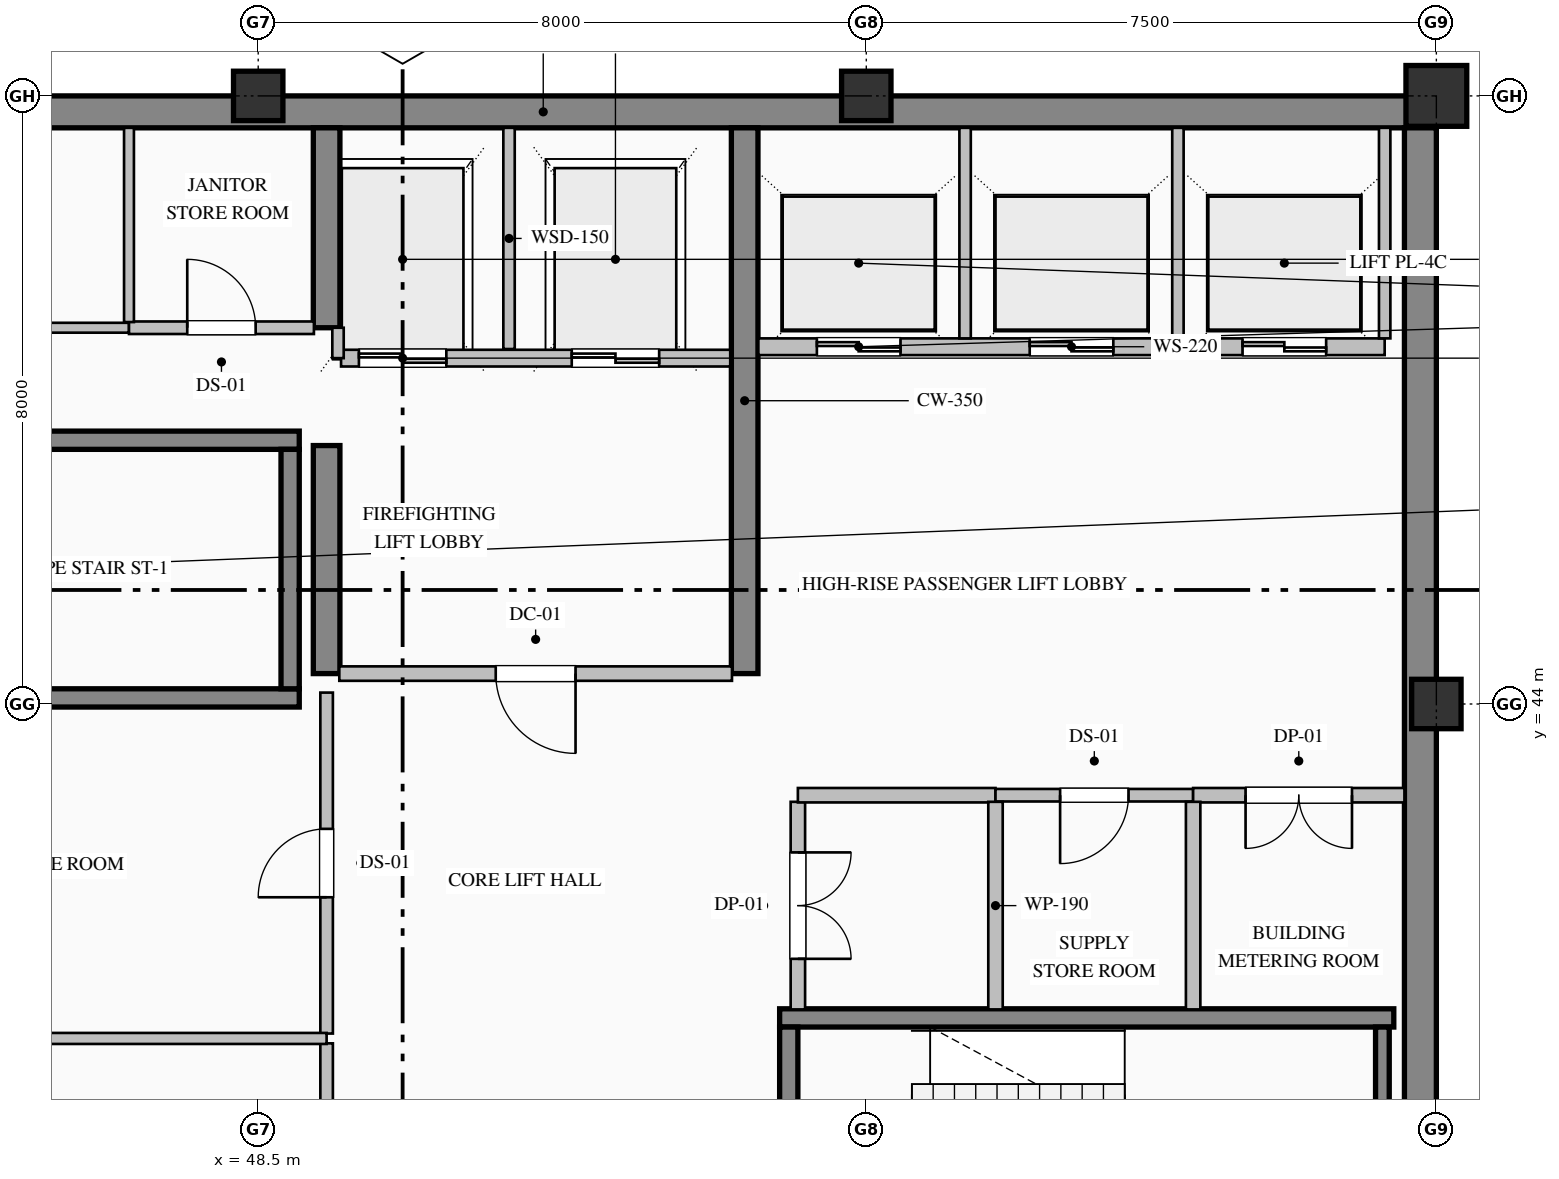
"""IFC4 building model, lengths in metres.
Left out: names, types, materials, properties, quantities, classifications, styles, units other than length and angle.
Written with IfcOpenShell. Run it as: python <this file> out.ifc"""

import sys

from ifc_helpers import new_model, si_unit, direction, frame, frame_2d, origin, origin_2d, place, context, subcontext, project, spatial, rectangle, hollow_rectangle, extrude, element, fill, save


model = new_model("IFC4")
c1 = context("Model", 3, precision=1e-05, world=origin(), true_north=direction((0.0, 1.0)))
c2 = subcontext(c1, "Body", "Model", "MODEL_VIEW")
j1 = project(units=[si_unit("LENGTHUNIT", "METRE"), si_unit("PLANEANGLEUNIT", "RADIAN")], contexts=[c1])
p1 = place(None, origin())
s1 = spatial("IfcSite", under=j1, at=p1, CompositionType="ELEMENT")
p2 = place(p1, origin())
s2 = spatial("IfcBuilding", under=s1, at=p2, CompositionType="ELEMENT")
p3 = place(p2, frame((0.0, 0.0, 307.2)))
s3 = spatial("IfcBuildingStorey", under=s2, at=p3, CompositionType="ELEMENT", Elevation=307.2)
p4 = place(p3, frame((40.5, 51.79, 0.0), z_axis=(0.0, 0.0, 1.0), x_axis=(1.0, 0.0, 0.0)))
e1 = element("IfcWall", 1, at=p4, inside=s3, PredefinedType="SHEAR", context=c2, shape_type="SweptSolid", body=[
    extrude(rectangle(XDim=23.5, YDim=0.42, at=frame_2d((11.75, 0.0))), origin(), (0.0, 0.0, 1.0), 3.785),
])
p5 = place(p3, frame((63.79, 36.32, 0.0), z_axis=(0.0, 0.0, 1.0), x_axis=(0.0, 1.0, 0.0)))
e2 = element("IfcWall", 2, at=p5, inside=s3, PredefinedType="SHEAR", context=c2, shape_type="SweptSolid", body=[
    extrude(rectangle(XDim=15.26, YDim=0.42, at=frame_2d((7.63, 0.0))), origin(), (0.0, 0.0, 1.0), 3.785),
])
p6 = place(p3, frame((49.4, 44.4, 0.0), z_axis=(0.0, 0.0, 1.0), x_axis=(0.0, 1.0, 0.0)))
e3 = element("IfcWall", 3, at=p6, inside=s3, PredefinedType="SHEAR", context=c2, shape_type="SweptSolid", body=[
    extrude(rectangle(XDim=3.0, YDim=0.35, at=frame_2d((1.5, 0.0))), origin(), (0.0, 0.0, 1.0), 3.785),
])
p7 = place(p3, frame((49.4, 48.95, 0.0), z_axis=(0.0, 0.0, 1.0), x_axis=(0.0, 1.0, 0.0)))
e4 = element("IfcWall", 4, at=p7, inside=s3, PredefinedType="SHEAR", context=c2, shape_type="SweptSolid", body=[
    extrude(rectangle(XDim=2.63, YDim=0.35, at=frame_2d((1.315, 0.0))), origin(), (0.0, 0.0, 1.0), 3.785),
])
p8 = place(p3, frame((54.9, 44.4, 0.0), z_axis=(0.0, 0.0, 1.0), x_axis=(0.0, 1.0, 0.0)))
e5 = element("IfcWall", 5, at=p8, inside=s3, PredefinedType="SHEAR", context=c2, shape_type="SweptSolid", body=[
    extrude(rectangle(XDim=7.18, YDim=0.35, at=frame_2d((3.59, 0.0))), origin(), (0.0, 0.0, 1.0), 3.785),
])
for number, where, z_axis, x_axis in (
    (6, (48.5, 52.0, 0.0), (0.0, 0.0, 1.0), (1.0, 0.0, 0.0)),
    (7, (56.5, 52.0, 0.0), (0.0, 0.0, 1.0), (1.0, 0.0, 0.0)),
    (8, (64.0, 44.0, 0.0), (0.0, 0.0, 1.0), (1.0, 0.0, 0.0)),
):
    element("IfcColumn", number, at=place(p3, frame(where, z_axis=z_axis, x_axis=x_axis)), inside=s3, PredefinedType="COLUMN", context=c2, shape_type="SweptSolid", body=[
        extrude(hollow_rectangle(XDim=0.65, YDim=0.65, WallThickness=0.028, at=origin_2d()), origin(), (0.0, 0.0, 1.0), 4.0),
    ])
p9 = place(p3, frame((64.0, 52.0, 0.0), z_axis=(0.0, 0.0, 1.0), x_axis=(1.0, 0.0, 0.0)))
e9 = element("IfcColumn", 9, at=p9, inside=s3, PredefinedType="COLUMN", context=c2, shape_type="SweptSolid", body=[
    extrude(hollow_rectangle(XDim=0.8, YDim=0.8, WallThickness=0.032, at=origin_2d()), origin(), (0.0, 0.0, 1.0), 4.0),
])
for number, where, z_axis, x_axis in (
    (10, (40.96, 47.47, 0.0), (0.0, 0.0, 1.0), (1.0, 0.0, 0.0)),
    (11, (49.04, 44.08, 0.0), (0.0, 0.0, 1.0), (-1.0, 0.0, 0.0)),
):
    element("IfcWall", number, at=place(p3, frame(where, z_axis=z_axis, x_axis=x_axis)), inside=s3, PredefinedType="SOLIDWALL", context=c2, shape_type="SweptSolid", body=[
        extrude(rectangle(XDim=8.08, YDim=0.24, at=frame_2d((4.04, 0.0))), origin(), (0.0, 0.0, 1.0), 4.0),
    ])
p10 = place(p3, frame((48.92, 44.2, 0.0), z_axis=(0.0, 0.0, 1.0), x_axis=(0.0, 1.0, 0.0)))
e12 = element("IfcWall", 12, at=p10, inside=s3, PredefinedType="SOLIDWALL", context=c2, shape_type="SweptSolid", body=[
    extrude(rectangle(XDim=3.15, YDim=0.24, at=frame_2d((1.575, 0.0))), origin(), (0.0, 0.0, 1.0), 4.0),
])
p11 = place(p3, frame((55.36, 39.87, 0.0), z_axis=(0.0, 0.0, 1.0), x_axis=(1.0, 0.0, 0.0)))
e13 = element("IfcWall", 13, at=p11, inside=s3, PredefinedType="SOLIDWALL", context=c2, shape_type="SweptSolid", body=[
    extrude(rectangle(XDim=8.08, YDim=0.24, at=frame_2d((4.04, 0.0))), origin(), (0.0, 0.0, 1.0), 4.0),
])
p12 = place(p3, frame((55.48, 39.75, 0.0), z_axis=(0.0, 0.0, 1.0), x_axis=(0.0, -1.0, 0.0)))
e14 = element("IfcWall", 14, at=p12, inside=s3, PredefinedType="SOLIDWALL", context=c2, shape_type="SweptSolid", body=[
    extrude(rectangle(XDim=3.15, YDim=0.24, at=frame_2d((1.575, 0.0))), origin(), (0.0, 0.0, 1.0), 4.0),
])
p13 = place(p12, frame((1.0, 0.0, 0.0)))
e15 = element("IfcOpeningElement", 15, at=p13, cuts=e14, PredefinedType="OPENING", context=c2, shape_type="SweptSolid", body=[
    extrude(rectangle(XDim=1.15, YDim=2.2, at=frame_2d((0.575, 1.1))), frame((0.0, 0.13, 0.0), z_axis=(0.0, -1.0, 0.0), x_axis=(1.0, 0.0, 0.0)), (0.0, 0.0, 1.0), 0.26),
])
p14 = place(p3, frame((63.29, 36.6, 0.0), z_axis=(0.0, 0.0, 1.0), x_axis=(0.0, 1.0, 0.0)))
e16 = element("IfcWall", 16, at=p14, inside=s3, PredefinedType="SOLIDWALL", context=c2, shape_type="SweptSolid", body=[
    extrude(rectangle(XDim=3.15, YDim=0.18, at=frame_2d((1.575, 0.0))), origin(), (0.0, 0.0, 1.0), 4.0),
])
p15 = place(p3, frame((54.71, 48.55, 0.0), z_axis=(0.0, 0.0, 1.0), x_axis=(-1.0, 0.0, 0.0)))
e17 = element("IfcWall", 17, at=p15, inside=s3, PredefinedType="PARTITIONING", context=c2, shape_type="SweptSolid", body=[
    extrude(rectangle(XDim=5.12, YDim=0.22, at=frame_2d((2.56, 0.0))), origin(), (0.0, 0.0, 1.0), 3.785),
])
p16 = place(p15, frame((3.735, 0.0, 0.0)))
e18 = element("IfcOpeningElement", 18, at=p16, cuts=e17, PredefinedType="OPENING", context=c2, shape_type="SweptSolid", body=[
    extrude(rectangle(XDim=1.15, YDim=2.2, at=frame_2d((0.575, 1.1))), frame((0.0, 0.12, 0.0), z_axis=(0.0, -1.0, 0.0), x_axis=(1.0, 0.0, 0.0)), (0.0, 0.0, 1.0), 0.24),
])
p17 = place(p15, frame((0.935, 0.0, 0.0)))
e19 = element("IfcOpeningElement", 19, at=p17, cuts=e17, PredefinedType="OPENING", context=c2, shape_type="SweptSolid", body=[
    extrude(rectangle(XDim=1.15, YDim=2.2, at=frame_2d((0.575, 1.1))), frame((0.0, 0.12, 0.0), z_axis=(0.0, -1.0, 0.0), x_axis=(1.0, 0.0, 0.0)), (0.0, 0.0, 1.0), 0.24),
])
p18 = place(p3, frame((51.8, 48.67, 0.0), z_axis=(0.0, 0.0, 1.0), x_axis=(0.0, 1.0, 0.0)))
e20 = element("IfcWall", 20, at=p18, inside=s3, PredefinedType="PARTITIONING", context=c2, shape_type="SweptSolid", body=[
    extrude(rectangle(XDim=2.91, YDim=0.15, at=frame_2d((1.455, 0.0))), origin(), (0.0, 0.0, 1.0), 3.785),
])
p19 = place(p3, frame((49.55, 48.55, 0.0), z_axis=(0.0, 0.0, 1.0), x_axis=(0.0, 1.0, 0.0)))
e21 = element("IfcWall", 21, at=p19, inside=s3, PredefinedType="PARTITIONING", context=c2, shape_type="SweptSolid", body=[
    extrude(rectangle(XDim=0.4, YDim=0.15, at=frame_2d((0.2, 0.0))), origin(), (0.0, 0.0, 1.0), 3.785),
])
p20 = place(p3, frame((63.32, 48.7, 0.0), z_axis=(0.0, 0.0, 1.0), x_axis=(-1.0, 0.0, 0.0)))
e22 = element("IfcWall", 22, at=p20, inside=s3, PredefinedType="PARTITIONING", context=c2, shape_type="SweptSolid", body=[
    extrude(rectangle(XDim=8.24, YDim=0.22, at=frame_2d((4.12, 0.0))), origin(), (0.0, 0.0, 1.0), 3.785),
])
p21 = place(p20, frame((6.37, 0.0, 0.0)))
e23 = element("IfcOpeningElement", 23, at=p21, cuts=e22, PredefinedType="OPENING", context=c2, shape_type="SweptSolid", body=[
    extrude(rectangle(XDim=1.1, YDim=2.2, at=frame_2d((0.55, 1.1))), frame((0.0, 0.12, 0.0), z_axis=(0.0, -1.0, 0.0), x_axis=(1.0, 0.0, 0.0)), (0.0, 0.0, 1.0), 0.24),
])
p22 = place(p20, frame((3.57, 0.0, 0.0)))
e24 = element("IfcOpeningElement", 24, at=p22, cuts=e22, PredefinedType="OPENING", context=c2, shape_type="SweptSolid", body=[
    extrude(rectangle(XDim=1.1, YDim=2.2, at=frame_2d((0.55, 1.1))), frame((0.0, 0.12, 0.0), z_axis=(0.0, -1.0, 0.0), x_axis=(1.0, 0.0, 0.0)), (0.0, 0.0, 1.0), 0.24),
])
p23 = place(p20, frame((0.77, 0.0, 0.0)))
e25 = element("IfcOpeningElement", 25, at=p23, cuts=e22, PredefinedType="OPENING", context=c2, shape_type="SweptSolid", body=[
    extrude(rectangle(XDim=1.1, YDim=2.2, at=frame_2d((0.55, 1.1))), frame((0.0, 0.12, 0.0), z_axis=(0.0, -1.0, 0.0), x_axis=(1.0, 0.0, 0.0)), (0.0, 0.0, 1.0), 0.24),
])
for number, where, z_axis, x_axis in (
    (26, (57.8, 48.81, 0.0), (0.0, 0.0, 1.0), (0.0, 1.0, 0.0)),
    (27, (60.6, 48.81, 0.0), (0.0, 0.0, 1.0), (0.0, 1.0, 0.0)),
    (28, (63.32, 48.81, 0.0), (0.0, 0.0, 1.0), (0.0, 1.0, 0.0)),
):
    element("IfcWall", number, at=place(p3, frame(where, z_axis=z_axis, x_axis=x_axis)), inside=s3, PredefinedType="PARTITIONING", context=c2, shape_type="SweptSolid", body=[
        extrude(rectangle(XDim=2.77, YDim=0.15, at=frame_2d((1.385, 0.0))), origin(), (0.0, 0.0, 1.0), 3.785),
    ])
p24 = place(p3, frame((40.92, 48.95, 0.0), z_axis=(0.0, 0.0, 1.0), x_axis=(1.0, 0.0, 0.0)))
e29 = element("IfcWall", 29, at=p24, inside=s3, PredefinedType="PARTITIONING", context=c2, shape_type="SweptSolid", body=[
    extrude(rectangle(XDim=5.88, YDim=0.13, at=frame_2d((2.94, 0.0))), origin(), (0.0, 0.0, 1.0), 3.785),
])
p25 = place(p24, frame((2.48, 0.0, 0.0)))
e30 = element("IfcOpeningElement", 30, at=p25, cuts=e29, PredefinedType="OPENING", context=c2, shape_type="SweptSolid", body=[
    extrude(rectangle(XDim=0.92, YDim=2.15, at=frame_2d((0.46, 1.075))), frame((0.0, 0.075, 0.0), z_axis=(0.0, -1.0, 0.0), x_axis=(1.0, 0.0, 0.0)), (0.0, 0.0, 1.0), 0.15),
])
p26 = place(p3, frame((46.8, 48.95, 0.0), z_axis=(0.0, 0.0, 1.0), x_axis=(1.0, 0.0, 0.0)))
e31 = element("IfcWall", 31, at=p26, inside=s3, PredefinedType="PARTITIONING", context=c2, shape_type="SweptSolid", body=[
    extrude(rectangle(XDim=2.433, YDim=0.165, at=frame_2d((1.216, 0.0))), origin(), (0.0, 0.0, 1.0), 3.785),
])
p27 = place(p26, frame((0.767, 0.0, 0.0)))
e32 = element("IfcOpeningElement", 32, at=p27, cuts=e31, PredefinedType="OPENING", context=c2, shape_type="SweptSolid", body=[
    extrude(rectangle(XDim=0.9, YDim=2.15, at=frame_2d((0.45, 1.075))), frame((0.0, 0.093, 0.0), z_axis=(0.0, -1.0, 0.0), x_axis=(1.0, 0.0, 0.0)), (0.0, 0.0, 1.0), 0.185),
])
p28 = place(p3, frame((54.733, 44.4, 0.0), z_axis=(0.0, 0.0, 1.0), x_axis=(-1.0, 0.0, 0.0)))
e33 = element("IfcWall", 33, at=p28, inside=s3, PredefinedType="PARTITIONING", context=c2, shape_type="SweptSolid", body=[
    extrude(rectangle(XDim=5.166, YDim=0.19, at=frame_2d((2.583, 0.0))), origin(), (0.0, 0.0, 1.0), 3.785),
])
p29 = place(p28, frame((2.058, 0.0, 0.0)))
e34 = element("IfcOpeningElement", 34, at=p29, cuts=e33, PredefinedType="OPENING", context=c2, shape_type="SweptSolid", body=[
    extrude(rectangle(XDim=1.05, YDim=2.15, at=frame_2d((0.525, 1.075))), frame((0.0, 0.105, 0.0), z_axis=(0.0, -1.0, 0.0), x_axis=(1.0, 0.0, 0.0)), (0.0, 0.0, 1.0), 0.21),
])
p30 = place(p3, frame((49.4, 36.42, 0.0), z_axis=(0.0, 0.0, 1.0), x_axis=(0.0, 1.0, 0.0)))
e35 = element("IfcWall", 35, at=p30, inside=s3, PredefinedType="PARTITIONING", context=c2, shape_type="SweptSolid", body=[
    extrude(rectangle(XDim=3.115, YDim=0.165, at=frame_2d((1.558, 0.0))), origin(), (0.0, 0.0, 1.0), 3.027),
])
p31 = place(p30, frame((1.058, 0.0, 0.0)))
e36 = element("IfcOpeningElement", 36, at=p31, cuts=e35, PredefinedType="OPENING", context=c2, shape_type="SweptSolid", body=[
    extrude(rectangle(XDim=1.0, YDim=2.15, at=frame_2d((0.5, 1.075))), frame((0.0, 0.093, 0.0), z_axis=(0.0, -1.0, 0.0), x_axis=(1.0, 0.0, 0.0)), (0.0, 0.0, 1.0), 0.185),
])
p32 = place(p3, frame((49.4, 39.665, 0.0), z_axis=(0.0, 0.0, 1.0), x_axis=(0.0, 1.0, 0.0)))
e37 = element("IfcWall", 37, at=p32, inside=s3, PredefinedType="PARTITIONING", context=c2, shape_type="SweptSolid", body=[
    extrude(rectangle(XDim=4.485, YDim=0.165, at=frame_2d((2.243, 0.0))), origin(), (0.0, 0.0, 1.0), 3.027),
])
p33 = place(p32, frame((1.793, 0.0, 0.0)))
e38 = element("IfcOpeningElement", 38, at=p33, cuts=e37, PredefinedType="OPENING", context=c2, shape_type="SweptSolid", body=[
    extrude(rectangle(XDim=0.9, YDim=2.15, at=frame_2d((0.45, 1.075))), frame((0.0, 0.093, 0.0), z_axis=(0.0, -1.0, 0.0), x_axis=(1.0, 0.0, 0.0)), (0.0, 0.0, 1.0), 0.185),
])
p34 = place(p3, frame((55.6, 42.713, 0.0), z_axis=(0.0, 0.0, 1.0), x_axis=(0.0, -1.0, 0.0)))
e39 = element("IfcWall", 39, at=p34, inside=s3, PredefinedType="PARTITIONING", context=c2, shape_type="SweptSolid", body=[
    extrude(rectangle(XDim=2.731, YDim=0.19, at=frame_2d((1.365, 0.0))), origin(), (0.0, 0.0, 1.0), 3.785),
])
p35 = place(p34, frame((0.666, 0.0, 0.0)))
e40 = element("IfcOpeningElement", 40, at=p35, cuts=e39, PredefinedType="OPENING", context=c2, shape_type="SweptSolid", body=[
    extrude(rectangle(XDim=1.4, YDim=2.25, at=frame_2d((0.7, 1.125))), frame((0.0, 0.105, 0.0), z_axis=(0.0, -1.0, 0.0), x_axis=(1.0, 0.0, 0.0)), (0.0, 0.0, 1.0), 0.21),
])
p36 = place(p3, frame((40.92, 39.6, 0.0), z_axis=(0.0, 0.0, 1.0), x_axis=(1.0, 0.0, 0.0)))
e41 = element("IfcWall", 41, at=p36, inside=s3, PredefinedType="PARTITIONING", context=c2, shape_type="SweptSolid", body=[
    extrude(rectangle(XDim=8.48, YDim=0.145, at=frame_2d((4.24, 0.0))), origin(), (0.0, 0.0, 1.0), 3.785),
])
p37 = place(p3, frame((58.2, 42.8, 0.0), z_axis=(0.0, 0.0, 1.0), x_axis=(-1.0, 0.0, 0.0)))
e42 = element("IfcWall", 42, at=p37, inside=s3, PredefinedType="PARTITIONING", context=c2, shape_type="SweptSolid", body=[
    extrude(rectangle(XDim=2.6, YDim=0.19, at=frame_2d((1.3, 0.0))), origin(), (0.0, 0.0, 1.0), 3.785),
])
p38 = place(p3, frame((60.8, 42.8, 0.0), z_axis=(0.0, 0.0, 1.0), x_axis=(-1.0, 0.0, 0.0)))
e43 = element("IfcWall", 43, at=p38, inside=s3, PredefinedType="PARTITIONING", context=c2, shape_type="SweptSolid", body=[
    extrude(rectangle(XDim=2.6, YDim=0.165, at=frame_2d((1.3, 0.0))), origin(), (0.0, 0.0, 1.0), 3.785),
])
p39 = place(p38, frame((0.85, 0.0, 0.0)))
e44 = element("IfcOpeningElement", 44, at=p39, cuts=e43, PredefinedType="OPENING", context=c2, shape_type="SweptSolid", body=[
    extrude(rectangle(XDim=0.9, YDim=2.15, at=frame_2d((0.45, 1.075))), frame((0.0, 0.093, 0.0), z_axis=(0.0, -1.0, 0.0), x_axis=(1.0, 0.0, 0.0)), (0.0, 0.0, 1.0), 0.185),
])
p40 = place(p3, frame((63.58, 42.8, 0.0), z_axis=(0.0, 0.0, 1.0), x_axis=(-1.0, 0.0, 0.0)))
e45 = element("IfcWall", 45, at=p40, inside=s3, PredefinedType="PARTITIONING", context=c2, shape_type="SweptSolid", body=[
    extrude(rectangle(XDim=2.78, YDim=0.19, at=frame_2d((1.39, 0.0))), origin(), (0.0, 0.0, 1.0), 3.785),
])
p41 = place(p40, frame((0.69, 0.0, 0.0)))
e46 = element("IfcOpeningElement", 46, at=p41, cuts=e45, PredefinedType="OPENING", context=c2, shape_type="SweptSolid", body=[
    extrude(rectangle(XDim=1.4, YDim=2.25, at=frame_2d((0.7, 1.125))), frame((0.0, 0.105, 0.0), z_axis=(0.0, -1.0, 0.0), x_axis=(1.0, 0.0, 0.0)), (0.0, 0.0, 1.0), 0.21),
])
p42 = place(p3, frame((46.8, 51.58, 0.0), z_axis=(0.0, 0.0, 1.0), x_axis=(0.0, -1.0, 0.0)))
e47 = element("IfcWall", 47, at=p42, inside=s3, PredefinedType="PARTITIONING", context=c2, shape_type="SweptSolid", body=[
    extrude(rectangle(XDim=2.556, YDim=0.13, at=frame_2d((1.278, 0.0))), origin(), (0.0, 0.0, 1.0), 3.785),
])
for number, where, z_axis, x_axis in (
    (48, (58.2, 42.713, 0.0), (0.0, 0.0, 1.0), (0.0, -1.0, 0.0)),
    (49, (60.8, 42.713, 0.0), (0.0, 0.0, 1.0), (0.0, -1.0, 0.0)),
):
    element("IfcWall", number, at=place(p3, frame(where, z_axis=z_axis, x_axis=x_axis)), inside=s3, PredefinedType="PARTITIONING", context=c2, shape_type="SweptSolid", body=[
        extrude(rectangle(XDim=2.731, YDim=0.19, at=frame_2d((1.365, 0.0))), origin(), (0.0, 0.0, 1.0), 3.785),
    ])
p43 = place(p16, origin())
e50 = element("IfcDoor", 50, at=p43, inside=s3, OperationType="DOUBLE_DOOR_SLIDING", PredefinedType="DOOR", context=c2, shape_type="SweptSolid", body=[
    extrude(rectangle(XDim=1.15, YDim=2.2, at=frame_2d((0.575, 1.1))), frame((0.0, 0.025, 0.0), z_axis=(0.0, -1.0, 0.0), x_axis=(1.0, 0.0, 0.0)), (0.0, 0.0, 1.0), 0.05),
])
fill(e18, e50)
p44 = place(p17, origin())
e51 = element("IfcDoor", 51, at=p44, inside=s3, OperationType="DOUBLE_DOOR_SLIDING", PredefinedType="DOOR", context=c2, shape_type="SweptSolid", body=[
    extrude(rectangle(XDim=1.15, YDim=2.2, at=frame_2d((0.575, 1.1))), frame((0.0, 0.025, 0.0), z_axis=(0.0, -1.0, 0.0), x_axis=(1.0, 0.0, 0.0)), (0.0, 0.0, 1.0), 0.05),
])
fill(e19, e51)
p45 = place(p21, origin())
e52 = element("IfcDoor", 52, at=p45, inside=s3, OperationType="DOUBLE_DOOR_SLIDING", PredefinedType="DOOR", context=c2, shape_type="SweptSolid", body=[
    extrude(rectangle(XDim=1.1, YDim=2.2, at=frame_2d((0.55, 1.1))), frame((0.0, 0.025, 0.0), z_axis=(0.0, -1.0, 0.0), x_axis=(1.0, 0.0, 0.0)), (0.0, 0.0, 1.0), 0.05),
])
fill(e23, e52)
p46 = place(p22, origin())
e53 = element("IfcDoor", 53, at=p46, inside=s3, OperationType="DOUBLE_DOOR_SLIDING", PredefinedType="DOOR", context=c2, shape_type="SweptSolid", body=[
    extrude(rectangle(XDim=1.1, YDim=2.2, at=frame_2d((0.55, 1.1))), frame((0.0, 0.025, 0.0), z_axis=(0.0, -1.0, 0.0), x_axis=(1.0, 0.0, 0.0)), (0.0, 0.0, 1.0), 0.05),
])
fill(e24, e53)
p47 = place(p23, origin())
e54 = element("IfcDoor", 54, at=p47, inside=s3, OperationType="DOUBLE_DOOR_SLIDING", PredefinedType="DOOR", context=c2, shape_type="SweptSolid", body=[
    extrude(rectangle(XDim=1.1, YDim=2.2, at=frame_2d((0.55, 1.1))), frame((0.0, 0.025, 0.0), z_axis=(0.0, -1.0, 0.0), x_axis=(1.0, 0.0, 0.0)), (0.0, 0.0, 1.0), 0.05),
])
fill(e25, e54)
p48 = place(p29, origin())
e55 = element("IfcDoor", 55, at=p48, inside=s3, OperationType="SINGLE_SWING_LEFT", PredefinedType="DOOR", context=c2, shape_type="SweptSolid", body=[
    extrude(rectangle(XDim=1.05, YDim=2.15, at=frame_2d((0.525, 1.075))), frame((0.0, 0.025, 0.0), z_axis=(0.0, -1.0, 0.0), x_axis=(1.0, 0.0, 0.0)), (0.0, 0.0, 1.0), 0.05),
])
fill(e34, e55)
p49 = place(p33, origin())
e56 = element("IfcDoor", 56, at=p49, inside=s3, OperationType="SINGLE_SWING_LEFT", PredefinedType="DOOR", context=c2, shape_type="SweptSolid", body=[
    extrude(rectangle(XDim=0.9, YDim=2.15, at=frame_2d((0.45, 1.075))), frame((0.0, 0.025, 0.0), z_axis=(0.0, -1.0, 0.0), x_axis=(1.0, 0.0, 0.0)), (0.0, 0.0, 1.0), 0.05),
])
fill(e38, e56)
p50 = place(p27, origin())
e57 = element("IfcDoor", 57, at=p50, inside=s3, OperationType="SINGLE_SWING_LEFT", PredefinedType="DOOR", context=c2, shape_type="SweptSolid", body=[
    extrude(rectangle(XDim=0.9, YDim=2.15, at=frame_2d((0.45, 1.075))), frame((0.0, 0.025, 0.0), z_axis=(0.0, -1.0, 0.0), x_axis=(1.0, 0.0, 0.0)), (0.0, 0.0, 1.0), 0.05),
])
fill(e32, e57)
p51 = place(p35, origin())
e58 = element("IfcDoor", 58, at=p51, inside=s3, OperationType="DOUBLE_DOOR_SINGLE_SWING", PredefinedType="DOOR", context=c2, shape_type="SweptSolid", body=[
    extrude(rectangle(XDim=1.4, YDim=2.25, at=frame_2d((0.7, 1.125))), frame((0.0, 0.025, 0.0), z_axis=(0.0, -1.0, 0.0), x_axis=(1.0, 0.0, 0.0)), (0.0, 0.0, 1.0), 0.05),
])
fill(e40, e58)
p52 = place(p39, origin())
e59 = element("IfcDoor", 59, at=p52, inside=s3, OperationType="SINGLE_SWING_RIGHT", PredefinedType="DOOR", context=c2, shape_type="SweptSolid", body=[
    extrude(rectangle(XDim=0.9, YDim=2.15, at=frame_2d((0.45, 1.075))), frame((0.0, 0.025, 0.0), z_axis=(0.0, -1.0, 0.0), x_axis=(1.0, 0.0, 0.0)), (0.0, 0.0, 1.0), 0.05),
])
fill(e44, e59)
p53 = place(p41, origin())
e60 = element("IfcDoor", 60, at=p53, inside=s3, OperationType="DOUBLE_DOOR_SINGLE_SWING", PredefinedType="DOOR", context=c2, shape_type="SweptSolid", body=[
    extrude(rectangle(XDim=1.4, YDim=2.25, at=frame_2d((0.7, 1.125))), frame((0.0, 0.025, 0.0), z_axis=(0.0, -1.0, 0.0), x_axis=(1.0, 0.0, 0.0)), (0.0, 0.0, 1.0), 0.05),
])
fill(e46, e60)
save(model, sys.argv[1])
